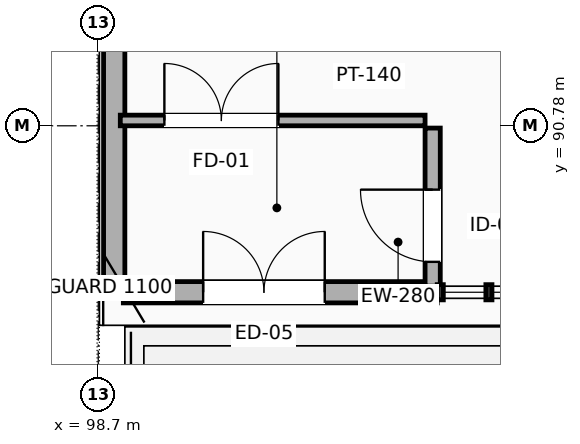
"""IFC4 building model, lengths in metres.
Left out: names, types, materials, properties, quantities, classifications, styles, units other than length and angle.
Written with IfcOpenShell. Run it as: python <this file> out.ifc"""

import sys

from ifc_helpers import new_model, si_unit, direction, frame, frame_2d, origin, place, context, subcontext, project, spatial, rectangle, extrude, element, fill, save


model = new_model("IFC4")
c1 = context("Model", 3, precision=1e-05, world=origin(), true_north=direction((0.0, 1.0)))
c2 = subcontext(c1, "Body", "Model", "MODEL_VIEW")
j1 = project(units=[si_unit("LENGTHUNIT", "METRE"), si_unit("PLANEANGLEUNIT", "RADIAN")], contexts=[c1])
p1 = place(None, origin())
s1 = spatial("IfcSite", under=j1, at=p1, CompositionType="ELEMENT")
p2 = place(p1, origin())
s2 = spatial("IfcBuilding", under=s1, at=p2, CompositionType="ELEMENT")
p3 = place(p2, frame((0.0, 0.0, 14.7)))
s3 = spatial("IfcBuildingStorey", under=s2, at=p3, CompositionType="ELEMENT", Elevation=14.7)
p4 = place(p3, frame((99.03, 88.59, 0.0), z_axis=(0.0, 0.0, 1.0), x_axis=(1.0, 0.0, 0.0)))
e1 = element("IfcWall", 1, at=p4, inside=s3, PredefinedType="SOLIDWALL", context=c2, shape_type="SweptSolid", body=[
    extrude(rectangle(XDim=4.13, YDim=0.28, at=frame_2d((2.065, 0.0))), origin(), (0.0, 0.0, 1.0), 4.225),
])
p5 = place(p4, frame((1.05, 0.0, 0.0)))
e2 = element("IfcOpeningElement", 2, at=p5, cuts=e1, PredefinedType="OPENING", context=c2, shape_type="SweptSolid", body=[
    extrude(rectangle(XDim=1.6, YDim=2.3, at=frame_2d((0.8, 1.15))), frame((0.0, 0.15, 0.0), z_axis=(0.0, -1.0, 0.0), x_axis=(1.0, 0.0, 0.0)), (0.0, 0.0, 1.0), 0.3),
])
p6 = place(p3, frame((98.91, 88.6, 0.0), z_axis=(0.0, 0.0, 1.0), x_axis=(0.0, 1.0, 0.0)))
e3 = element("IfcWall", 3, at=p6, inside=s3, PredefinedType="SOLIDWALL", context=c2, shape_type="SweptSolid", body=[
    extrude(rectangle(XDim=5.6, YDim=0.28, at=frame_2d((2.8, 0.0))), origin(), (0.0, 0.0, 1.0), 4.225),
])
p7 = place(p3, frame((103.1, 88.67, 0.0), z_axis=(0.0, 0.0, 1.0), x_axis=(0.0, 1.0, 0.0)))
e4 = element("IfcWall", 4, at=p7, inside=s3, PredefinedType="PARTITIONING", context=c2, shape_type="SweptSolid", body=[
    extrude(rectangle(XDim=2.08, YDim=0.2, at=frame_2d((1.04, 0.0))), origin(), (0.0, 0.0, 1.0), 4.225),
])
p8 = place(p7, frame((0.32, 0.0, 0.0)))
e5 = element("IfcOpeningElement", 5, at=p8, cuts=e4, PredefinedType="OPENING", context=c2, shape_type="SweptSolid", body=[
    extrude(rectangle(XDim=0.95, YDim=2.15, at=frame_2d((0.475, 1.075))), frame((0.0, 0.11, 0.0), z_axis=(0.0, -1.0, 0.0), x_axis=(1.0, 0.0, 0.0)), (0.0, 0.0, 1.0), 0.22),
])
p9 = place(p3, frame((98.99, 90.85, 0.0), z_axis=(0.0, 0.0, 1.0), x_axis=(1.0, 0.0, 0.0)))
e6 = element("IfcWall", 6, at=p9, inside=s3, PredefinedType="PARTITIONING", context=c2, shape_type="SweptSolid", body=[
    extrude(rectangle(XDim=4.01, YDim=0.14, at=frame_2d((2.005, 0.0))), origin(), (0.0, 0.0, 1.0), 4.225),
])
p10 = place(p9, frame((0.58, 0.0, 0.0)))
e7 = element("IfcOpeningElement", 7, at=p10, cuts=e6, PredefinedType="OPENING", context=c2, shape_type="SweptSolid", body=[
    extrude(rectangle(XDim=1.5, YDim=2.2, at=frame_2d((0.75, 1.1))), frame((0.0, 0.08, 0.0), z_axis=(0.0, -1.0, 0.0), x_axis=(1.0, 0.0, 0.0)), (0.0, 0.0, 1.0), 0.16),
])
p11 = place(p5, origin())
e8 = element("IfcDoor", 8, at=p11, inside=s3, OperationType="DOUBLE_DOOR_SINGLE_SWING", PredefinedType="DOOR", context=c2, shape_type="SweptSolid", body=[
    extrude(rectangle(XDim=1.6, YDim=2.3, at=frame_2d((0.8, 1.15))), frame((0.0, 0.025, 0.0), z_axis=(0.0, -1.0, 0.0), x_axis=(1.0, 0.0, 0.0)), (0.0, 0.0, 1.0), 0.05),
])
fill(e2, e8)
p12 = place(p8, origin())
e9 = element("IfcDoor", 9, at=p12, inside=s3, OperationType="SINGLE_SWING_RIGHT", PredefinedType="DOOR", context=c2, shape_type="SweptSolid", body=[
    extrude(rectangle(XDim=0.95, YDim=2.15, at=frame_2d((0.475, 1.075))), frame((0.0, 0.025, 0.0), z_axis=(0.0, -1.0, 0.0), x_axis=(1.0, 0.0, 0.0)), (0.0, 0.0, 1.0), 0.05),
])
fill(e5, e9)
p13 = place(p10, origin())
e10 = element("IfcDoor", 10, at=p13, inside=s3, OperationType="DOUBLE_DOOR_SINGLE_SWING", PredefinedType="DOOR", context=c2, shape_type="SweptSolid", body=[
    extrude(rectangle(XDim=1.5, YDim=2.2, at=frame_2d((0.75, 1.1))), frame((0.0, 0.025, 0.0), z_axis=(0.0, -1.0, 0.0), x_axis=(1.0, 0.0, 0.0)), (0.0, 0.0, 1.0), 0.05),
])
fill(e7, e10)
save(model, sys.argv[1])
